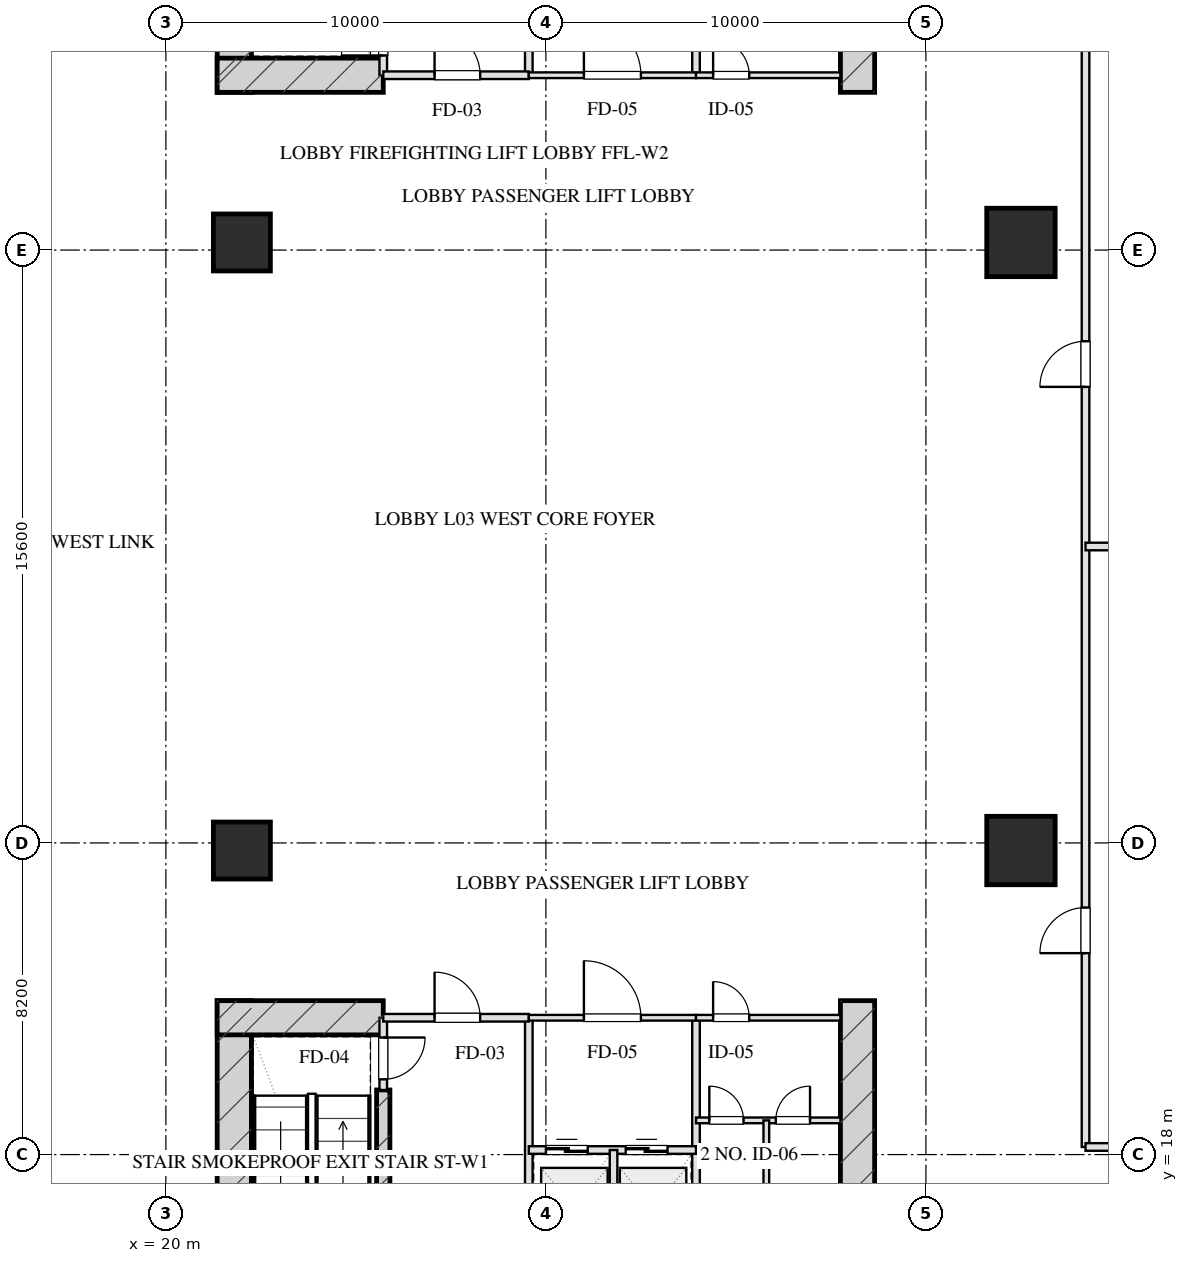
"""IFC4 building model, lengths in metres.
Left out: names, types, materials, properties, quantities, classifications, styles, units other than length and angle.
Written with IfcOpenShell. Run it as: python <this file> out.ifc"""

import sys

from ifc_helpers import new_model, si_unit, direction, frame, frame_2d, origin, origin_2d, place, context, subcontext, project, spatial, rectangle, hollow_rectangle, extrude, element, fill, save


model = new_model("IFC4")
c1 = context("Model", 3, precision=1e-05, world=origin(), true_north=direction((0.0, 1.0)))
c2 = subcontext(c1, "Body", "Model", "MODEL_VIEW")
j1 = project(units=[si_unit("LENGTHUNIT", "METRE"), si_unit("PLANEANGLEUNIT", "RADIAN")], contexts=[c1])
p1 = place(None, origin())
s1 = spatial("IfcSite", under=j1, at=p1, CompositionType="ELEMENT")
p2 = place(p1, origin())
s2 = spatial("IfcBuilding", under=s1, at=p2, CompositionType="ELEMENT")
p3 = place(p2, frame((0.0, 0.0, 16.5)))
s3 = spatial("IfcBuildingStorey", under=s2, at=p3, CompositionType="ELEMENT", Elevation=16.5)
for number, where, z_axis, x_axis in (
    (1, (21.8, 22.05, 0.0), (0.0, 0.0, 1.0), (0.0, -1.0, 0.0)),
    (2, (38.2, 22.05, 0.0), (0.0, 0.0, 1.0), (0.0, -1.0, 0.0)),
):
    element("IfcWall", number, at=place(p3, frame(where, z_axis=z_axis, x_axis=x_axis)), inside=s3, PredefinedType="SHEAR", context=c2, shape_type="SweptSolid", body=[
        extrude(rectangle(XDim=9.78, YDim=0.9, at=frame_2d((4.89, 0.0))), origin(), (0.0, 0.0, 1.0), 5.5),
    ])
p4 = place(p3, frame((25.72, 19.7, 0.0), z_axis=(0.0, 0.0, 1.0), x_axis=(0.0, -1.0, 0.0)))
e3 = element("IfcWall", 3, at=p4, inside=s3, PredefinedType="SHEAR", context=c2, shape_type="SweptSolid", body=[
    extrude(rectangle(XDim=6.98, YDim=0.35, at=frame_2d((3.49, 0.0))), origin(), (0.0, 0.0, 1.0), 5.5),
])
p5 = place(p3, frame((21.35, 21.6, 0.0), z_axis=(0.0, 0.0, 1.0), x_axis=(1.0, 0.0, 0.0)))
e4 = element("IfcWall", 4, at=p5, inside=s3, PredefinedType="SHEAR", context=c2, shape_type="SweptSolid", body=[
    extrude(rectangle(XDim=4.37, YDim=0.9, at=frame_2d((2.185, 0.0))), origin(), (0.0, 0.0, 1.0), 5.5),
])
for number, where, z_axis, x_axis in (
    (5, (21.8, 45.95, 0.0), (0.0, 0.0, 1.0), (0.0, 1.0, 0.0)),
    (6, (38.2, 45.95, 0.0), (0.0, 0.0, 1.0), (0.0, 1.0, 0.0)),
):
    element("IfcWall", number, at=place(p3, frame(where, z_axis=z_axis, x_axis=x_axis)), inside=s3, PredefinedType="SHEAR", context=c2, shape_type="SweptSolid", body=[
        extrude(rectangle(XDim=9.78, YDim=0.9, at=frame_2d((4.89, 0.0))), origin(), (0.0, 0.0, 1.0), 5.5),
    ])
p6 = place(p3, frame((21.35, 46.4, 0.0), z_axis=(0.0, 0.0, 1.0), x_axis=(1.0, 0.0, 0.0)))
e7 = element("IfcWall", 7, at=p6, inside=s3, PredefinedType="SHEAR", context=c2, shape_type="SweptSolid", body=[
    extrude(rectangle(XDim=4.37, YDim=0.9, at=frame_2d((2.185, 0.0))), origin(), (0.0, 0.0, 1.0), 5.5),
])
for number, where, z_axis, x_axis in (
    (8, (22.0, 26.0, 0.0), (0.0, 0.0, 1.0), (1.0, 0.0, 0.0)),
    (9, (22.0, 42.0, 0.0), (0.0, 0.0, 1.0), (1.0, 0.0, 0.0)),
):
    element("IfcColumn", number, at=place(p3, frame(where, z_axis=z_axis, x_axis=x_axis)), inside=s3, PredefinedType="COLUMN", context=c2, shape_type="SweptSolid", body=[
        extrude(rectangle(XDim=1.5, YDim=1.5, at=origin_2d()), origin(), (0.0, 0.0, 1.0), 5.501),
    ])
for number, where, z_axis, x_axis in (
    (10, (42.5, 26.0, 0.0), (0.0, 0.0, 1.0), (1.0, 0.0, 0.0)),
    (11, (42.5, 42.0, 0.0), (0.0, 0.0, 1.0), (1.0, 0.0, 0.0)),
):
    element("IfcColumn", number, at=place(p3, frame(where, z_axis=z_axis, x_axis=x_axis)), inside=s3, PredefinedType="COLUMN", context=c2, shape_type="SweptSolid", body=[
        extrude(hollow_rectangle(XDim=1.8, YDim=1.8, WallThickness=0.06, at=origin_2d()), origin(), (0.0, 0.0, 1.0), 5.501),
    ])
p7 = place(p3, frame((25.72, 21.6, 0.0), z_axis=(0.0, 0.0, 1.0), x_axis=(0.0, -1.0, 0.0)))
e12 = element("IfcWall", 12, at=p7, inside=s3, PredefinedType="PARTITIONING", context=c2, shape_type="SweptSolid", body=[
    extrude(rectangle(XDim=1.9, YDim=0.2, at=frame_2d((0.95, 0.0))), origin(), (0.0, 0.0, 1.0), 5.185),
])
p8 = place(p7, frame((0.52, 0.0, 0.0)))
e13 = element("IfcOpeningElement", 13, at=p8, cuts=e12, PredefinedType="OPENING", context=c2, shape_type="SweptSolid", body=[
    extrude(rectangle(XDim=1.1, YDim=2.05, at=frame_2d((0.55, 1.025))), frame((0.0, 0.11, 0.0), z_axis=(0.0, -1.0, 0.0), x_axis=(1.0, 0.0, 0.0)), (0.0, 0.0, 1.0), 0.22),
])
p9 = place(p3, frame((29.55, 21.6, 0.0), z_axis=(0.0, 0.0, 1.0), x_axis=(0.0, -1.0, 0.0)))
e14 = element("IfcWall", 14, at=p9, inside=s3, PredefinedType="PARTITIONING", context=c2, shape_type="SweptSolid", body=[
    extrude(rectangle(XDim=8.43, YDim=0.2, at=frame_2d((4.215, 0.0))), origin(), (0.0, 0.0, 1.0), 5.185),
])
p10 = place(p3, frame((25.72, 21.6, 0.0), z_axis=(0.0, 0.0, 1.0), x_axis=(1.0, 0.0, 0.0)))
e15 = element("IfcWall", 15, at=p10, inside=s3, PredefinedType="PARTITIONING", context=c2, shape_type="SweptSolid", body=[
    extrude(rectangle(XDim=3.83, YDim=0.2, at=frame_2d((1.915, 0.0))), origin(), (0.0, 0.0, 1.0), 5.185),
])
p11 = place(p10, frame((1.35, 0.0, 0.0)))
e16 = element("IfcOpeningElement", 16, at=p11, cuts=e15, PredefinedType="OPENING", context=c2, shape_type="SweptSolid", body=[
    extrude(rectangle(XDim=1.2, YDim=2.05, at=frame_2d((0.6, 1.025))), frame((0.0, 0.11, 0.0), z_axis=(0.0, -1.0, 0.0), x_axis=(1.0, 0.0, 0.0)), (0.0, 0.0, 1.0), 0.22),
])
p12 = place(p3, frame((33.95, 21.6, 0.0), z_axis=(0.0, 0.0, 1.0), x_axis=(0.0, -1.0, 0.0)))
e17 = element("IfcWall", 17, at=p12, inside=s3, PredefinedType="PARTITIONING", context=c2, shape_type="SweptSolid", body=[
    extrude(rectangle(XDim=8.43, YDim=0.2, at=frame_2d((4.215, 0.0))), origin(), (0.0, 0.0, 1.0), 5.185),
])
p13 = place(p3, frame((29.55, 21.6, 0.0), z_axis=(0.0, 0.0, 1.0), x_axis=(1.0, 0.0, 0.0)))
e18 = element("IfcWall", 18, at=p13, inside=s3, PredefinedType="PARTITIONING", context=c2, shape_type="SweptSolid", body=[
    extrude(rectangle(XDim=4.4, YDim=0.15, at=frame_2d((2.2, 0.0))), origin(), (0.0, 0.0, 1.0), 5.185),
])
p14 = place(p13, frame((1.45, 0.0, 0.0)))
e19 = element("IfcOpeningElement", 19, at=p14, cuts=e18, PredefinedType="OPENING", context=c2, shape_type="SweptSolid", body=[
    extrude(rectangle(XDim=1.5, YDim=2.05, at=frame_2d((0.75, 1.025))), frame((0.0, 0.085, 0.0), z_axis=(0.0, -1.0, 0.0), x_axis=(1.0, 0.0, 0.0)), (0.0, 0.0, 1.0), 0.17),
])
p15 = place(p3, frame((29.55, 18.12, 0.0), z_axis=(0.0, 0.0, 1.0), x_axis=(1.0, 0.0, 0.0)))
e20 = element("IfcWall", 20, at=p15, inside=s3, PredefinedType="PARTITIONING", context=c2, shape_type="SweptSolid", body=[
    extrude(rectangle(XDim=4.4, YDim=0.2, at=frame_2d((2.2, 0.0))), origin(), (0.0, 0.0, 1.0), 5.185),
])
p16 = place(p15, frame((0.45, 0.0, 0.0)))
e21 = element("IfcOpeningElement", 21, at=p16, cuts=e20, PredefinedType="OPENING", context=c2, shape_type="SweptSolid", body=[
    extrude(rectangle(XDim=1.1, YDim=2.05, at=frame_2d((0.55, 1.025))), frame((0.0, 0.11, 0.0), z_axis=(0.0, -1.0, 0.0), x_axis=(1.0, 0.0, 0.0)), (0.0, 0.0, 1.0), 0.22),
])
p17 = place(p15, frame((2.55, 0.0, 0.0)))
e22 = element("IfcOpeningElement", 22, at=p17, cuts=e20, PredefinedType="OPENING", context=c2, shape_type="SweptSolid", body=[
    extrude(rectangle(XDim=1.1, YDim=2.05, at=frame_2d((0.55, 1.025))), frame((0.0, 0.11, 0.0), z_axis=(0.0, -1.0, 0.0), x_axis=(1.0, 0.0, 0.0)), (0.0, 0.0, 1.0), 0.22),
])
p18 = place(p3, frame((31.78, 18.12, 0.0), z_axis=(0.0, 0.0, 1.0), x_axis=(0.0, -1.0, 0.0)))
e23 = element("IfcWall", 23, at=p18, inside=s3, PredefinedType="PARTITIONING", context=c2, shape_type="SweptSolid", body=[
    extrude(rectangle(XDim=4.95, YDim=0.2, at=frame_2d((2.475, 0.0))), origin(), (0.0, 0.0, 1.0), 5.185),
])
p19 = place(p3, frame((33.95, 21.6, 0.0), z_axis=(0.0, 0.0, 1.0), x_axis=(1.0, 0.0, 0.0)))
e24 = element("IfcWall", 24, at=p19, inside=s3, PredefinedType="PARTITIONING", context=c2, shape_type="SweptSolid", body=[
    extrude(rectangle(XDim=3.8, YDim=0.15, at=frame_2d((1.9, 0.0))), origin(), (0.0, 0.0, 1.0), 5.185),
])
p20 = place(p19, frame((0.45, 0.0, 0.0)))
e25 = element("IfcOpeningElement", 25, at=p20, cuts=e24, PredefinedType="OPENING", context=c2, shape_type="SweptSolid", body=[
    extrude(rectangle(XDim=0.95, YDim=2.05, at=frame_2d((0.475, 1.025))), frame((0.0, 0.085, 0.0), z_axis=(0.0, -1.0, 0.0), x_axis=(1.0, 0.0, 0.0)), (0.0, 0.0, 1.0), 0.17),
])
p21 = place(p3, frame((33.95, 18.9, 0.0), z_axis=(0.0, 0.0, 1.0), x_axis=(1.0, 0.0, 0.0)))
e26 = element("IfcWall", 26, at=p21, inside=s3, PredefinedType="PARTITIONING", context=c2, shape_type="SweptSolid", body=[
    extrude(rectangle(XDim=3.8, YDim=0.15, at=frame_2d((1.9, 0.0))), origin(), (0.0, 0.0, 1.0), 5.185),
])
p22 = place(p21, frame((0.35, 0.0, 0.0)))
e27 = element("IfcOpeningElement", 27, at=p22, cuts=e26, PredefinedType="OPENING", context=c2, shape_type="SweptSolid", body=[
    extrude(rectangle(XDim=0.9, YDim=2.05, at=frame_2d((0.45, 1.025))), frame((0.0, 0.085, 0.0), z_axis=(0.0, -1.0, 0.0), x_axis=(1.0, 0.0, 0.0)), (0.0, 0.0, 1.0), 0.17),
])
p23 = place(p21, frame((2.1, 0.0, 0.0)))
e28 = element("IfcOpeningElement", 28, at=p23, cuts=e26, PredefinedType="OPENING", context=c2, shape_type="SweptSolid", body=[
    extrude(rectangle(XDim=0.9, YDim=2.05, at=frame_2d((0.45, 1.025))), frame((0.0, 0.085, 0.0), z_axis=(0.0, -1.0, 0.0), x_axis=(1.0, 0.0, 0.0)), (0.0, 0.0, 1.0), 0.17),
])
p24 = place(p3, frame((35.8, 18.9, 0.0), z_axis=(0.0, 0.0, 1.0), x_axis=(0.0, -1.0, 0.0)))
e29 = element("IfcWall", 29, at=p24, inside=s3, PredefinedType="PARTITIONING", context=c2, shape_type="SweptSolid", body=[
    extrude(rectangle(XDim=5.73, YDim=0.15, at=frame_2d((2.865, 0.0))), origin(), (0.0, 0.0, 1.0), 5.185),
])
p25 = place(p3, frame((25.72, 46.4, 0.0), z_axis=(0.0, 0.0, 1.0), x_axis=(0.0, 1.0, 0.0)))
e30 = element("IfcWall", 30, at=p25, inside=s3, PredefinedType="PARTITIONING", context=c2, shape_type="SweptSolid", body=[
    extrude(rectangle(XDim=1.9, YDim=0.2, at=frame_2d((0.95, 0.0))), origin(), (0.0, 0.0, 1.0), 5.185),
])
p26 = place(p25, frame((0.52, 0.0, 0.0)))
e31 = element("IfcOpeningElement", 31, at=p26, cuts=e30, PredefinedType="OPENING", context=c2, shape_type="SweptSolid", body=[
    extrude(rectangle(XDim=1.1, YDim=2.05, at=frame_2d((0.55, 1.025))), frame((0.0, 0.11, 0.0), z_axis=(0.0, -1.0, 0.0), x_axis=(1.0, 0.0, 0.0)), (0.0, 0.0, 1.0), 0.22),
])
p27 = place(p3, frame((29.55, 46.4, 0.0), z_axis=(0.0, 0.0, 1.0), x_axis=(0.0, 1.0, 0.0)))
e32 = element("IfcWall", 32, at=p27, inside=s3, PredefinedType="PARTITIONING", context=c2, shape_type="SweptSolid", body=[
    extrude(rectangle(XDim=8.43, YDim=0.2, at=frame_2d((4.215, 0.0))), origin(), (0.0, 0.0, 1.0), 5.185),
])
p28 = place(p3, frame((25.72, 46.4, 0.0), z_axis=(0.0, 0.0, 1.0), x_axis=(1.0, 0.0, 0.0)))
e33 = element("IfcWall", 33, at=p28, inside=s3, PredefinedType="PARTITIONING", context=c2, shape_type="SweptSolid", body=[
    extrude(rectangle(XDim=3.83, YDim=0.2, at=frame_2d((1.915, 0.0))), origin(), (0.0, 0.0, 1.0), 5.185),
])
p29 = place(p28, frame((1.35, 0.0, 0.0)))
e34 = element("IfcOpeningElement", 34, at=p29, cuts=e33, PredefinedType="OPENING", context=c2, shape_type="SweptSolid", body=[
    extrude(rectangle(XDim=1.2, YDim=2.05, at=frame_2d((0.6, 1.025))), frame((0.0, 0.11, 0.0), z_axis=(0.0, -1.0, 0.0), x_axis=(1.0, 0.0, 0.0)), (0.0, 0.0, 1.0), 0.22),
])
p30 = place(p3, frame((33.95, 46.4, 0.0), z_axis=(0.0, 0.0, 1.0), x_axis=(0.0, 1.0, 0.0)))
e35 = element("IfcWall", 35, at=p30, inside=s3, PredefinedType="PARTITIONING", context=c2, shape_type="SweptSolid", body=[
    extrude(rectangle(XDim=8.43, YDim=0.2, at=frame_2d((4.215, 0.0))), origin(), (0.0, 0.0, 1.0), 5.185),
])
p31 = place(p3, frame((29.55, 46.4, 0.0), z_axis=(0.0, 0.0, 1.0), x_axis=(1.0, 0.0, 0.0)))
e36 = element("IfcWall", 36, at=p31, inside=s3, PredefinedType="PARTITIONING", context=c2, shape_type="SweptSolid", body=[
    extrude(rectangle(XDim=4.4, YDim=0.15, at=frame_2d((2.2, 0.0))), origin(), (0.0, 0.0, 1.0), 5.185),
])
p32 = place(p31, frame((1.45, 0.0, 0.0)))
e37 = element("IfcOpeningElement", 37, at=p32, cuts=e36, PredefinedType="OPENING", context=c2, shape_type="SweptSolid", body=[
    extrude(rectangle(XDim=1.5, YDim=2.05, at=frame_2d((0.75, 1.025))), frame((0.0, 0.085, 0.0), z_axis=(0.0, -1.0, 0.0), x_axis=(1.0, 0.0, 0.0)), (0.0, 0.0, 1.0), 0.17),
])
p33 = place(p3, frame((33.95, 46.4, 0.0), z_axis=(0.0, 0.0, 1.0), x_axis=(1.0, 0.0, 0.0)))
e38 = element("IfcWall", 38, at=p33, inside=s3, PredefinedType="PARTITIONING", context=c2, shape_type="SweptSolid", body=[
    extrude(rectangle(XDim=3.8, YDim=0.15, at=frame_2d((1.9, 0.0))), origin(), (0.0, 0.0, 1.0), 5.185),
])
p34 = place(p33, frame((0.45, 0.0, 0.0)))
e39 = element("IfcOpeningElement", 39, at=p34, cuts=e38, PredefinedType="OPENING", context=c2, shape_type="SweptSolid", body=[
    extrude(rectangle(XDim=0.95, YDim=2.05, at=frame_2d((0.475, 1.025))), frame((0.0, 0.085, 0.0), z_axis=(0.0, -1.0, 0.0), x_axis=(1.0, 0.0, 0.0)), (0.0, 0.0, 1.0), 0.17),
])
p35 = place(p3, frame((44.2, 18.2, 0.0), z_axis=(0.0, 0.0, 1.0), x_axis=(0.0, 1.0, 0.0)))
e40 = element("IfcWall", 40, at=p35, inside=s3, PredefinedType="PARTITIONING", context=c2, shape_type="SweptSolid", body=[
    extrude(rectangle(XDim=31.6, YDim=0.2, at=frame_2d((15.8, 0.0))), origin(), (0.0, 0.0, 1.0), 5.185),
])
p36 = place(p35, frame((5.1, 0.0, 0.0)))
e41 = element("IfcOpeningElement", 41, at=p36, cuts=e40, PredefinedType="OPENING", context=c2, shape_type="SweptSolid", body=[
    extrude(rectangle(XDim=1.2, YDim=2.05, at=frame_2d((0.6, 1.025))), frame((0.0, 0.11, 0.0), z_axis=(0.0, -1.0, 0.0), x_axis=(1.0, 0.0, 0.0)), (0.0, 0.0, 1.0), 0.22),
])
p37 = place(p35, frame((20.0, 0.0, 0.0)))
e42 = element("IfcOpeningElement", 42, at=p37, cuts=e40, PredefinedType="OPENING", context=c2, shape_type="SweptSolid", body=[
    extrude(rectangle(XDim=1.2, YDim=2.05, at=frame_2d((0.6, 1.025))), frame((0.0, 0.11, 0.0), z_axis=(0.0, -1.0, 0.0), x_axis=(1.0, 0.0, 0.0)), (0.0, 0.0, 1.0), 0.22),
])
p38 = place(p3, frame((44.2, 18.2, 0.0), z_axis=(0.0, 0.0, 1.0), x_axis=(1.0, 0.0, 0.0)))
e43 = element("IfcWall", 43, at=p38, inside=s3, PredefinedType="PARTITIONING", context=c2, shape_type="SweptSolid", body=[
    extrude(rectangle(XDim=30.6, YDim=0.2, at=frame_2d((15.3, 0.0))), origin(), (0.0, 0.0, 1.0), 5.185),
])
p39 = place(p3, frame((44.2, 34.0, 0.0), z_axis=(0.0, 0.0, 1.0), x_axis=(1.0, 0.0, 0.0)))
e44 = element("IfcWall", 44, at=p39, inside=s3, PredefinedType="PARTITIONING", context=c2, shape_type="SweptSolid", body=[
    extrude(rectangle(XDim=30.6, YDim=0.2, at=frame_2d((15.3, 0.0))), origin(), (0.0, 0.0, 1.0), 3.775),
])
p40 = place(p8, origin())
e45 = element("IfcDoor", 45, at=p40, inside=s3, OperationType="SINGLE_SWING_LEFT", PredefinedType="DOOR", context=c2, shape_type="SweptSolid", body=[
    extrude(rectangle(XDim=1.1, YDim=2.05, at=frame_2d((0.55, 1.025))), frame((0.0, 0.025, 0.0), z_axis=(0.0, -1.0, 0.0), x_axis=(1.0, 0.0, 0.0)), (0.0, 0.0, 1.0), 0.05),
])
fill(e13, e45)
p41 = place(p11, origin())
e46 = element("IfcDoor", 46, at=p41, inside=s3, OperationType="SINGLE_SWING_LEFT", PredefinedType="DOOR", context=c2, shape_type="SweptSolid", body=[
    extrude(rectangle(XDim=1.2, YDim=2.05, at=frame_2d((0.6, 1.025))), frame((0.0, 0.025, 0.0), z_axis=(0.0, -1.0, 0.0), x_axis=(1.0, 0.0, 0.0)), (0.0, 0.0, 1.0), 0.05),
])
fill(e16, e46)
p42 = place(p14, origin())
e47 = element("IfcDoor", 47, at=p42, inside=s3, OperationType="SINGLE_SWING_LEFT", PredefinedType="DOOR", context=c2, shape_type="SweptSolid", body=[
    extrude(rectangle(XDim=1.5, YDim=2.05, at=frame_2d((0.75, 1.025))), frame((0.0, 0.025, 0.0), z_axis=(0.0, -1.0, 0.0), x_axis=(1.0, 0.0, 0.0)), (0.0, 0.0, 1.0), 0.05),
])
fill(e19, e47)
p43 = place(p16, origin())
e48 = element("IfcDoor", 48, at=p43, inside=s3, OperationType="DOUBLE_DOOR_SLIDING", PredefinedType="DOOR", context=c2, shape_type="SweptSolid", body=[
    extrude(rectangle(XDim=1.1, YDim=2.05, at=frame_2d((0.55, 1.025))), frame((0.0, 0.025, 0.0), z_axis=(0.0, -1.0, 0.0), x_axis=(1.0, 0.0, 0.0)), (0.0, 0.0, 1.0), 0.05),
])
fill(e21, e48)
p44 = place(p17, origin())
e49 = element("IfcDoor", 49, at=p44, inside=s3, OperationType="DOUBLE_DOOR_SLIDING", PredefinedType="DOOR", context=c2, shape_type="SweptSolid", body=[
    extrude(rectangle(XDim=1.1, YDim=2.05, at=frame_2d((0.55, 1.025))), frame((0.0, 0.025, 0.0), z_axis=(0.0, -1.0, 0.0), x_axis=(1.0, 0.0, 0.0)), (0.0, 0.0, 1.0), 0.05),
])
fill(e22, e49)
p45 = place(p20, origin())
e50 = element("IfcDoor", 50, at=p45, inside=s3, OperationType="SINGLE_SWING_LEFT", PredefinedType="DOOR", context=c2, shape_type="SweptSolid", body=[
    extrude(rectangle(XDim=0.95, YDim=2.05, at=frame_2d((0.475, 1.025))), frame((0.0, 0.025, 0.0), z_axis=(0.0, -1.0, 0.0), x_axis=(1.0, 0.0, 0.0)), (0.0, 0.0, 1.0), 0.05),
])
fill(e25, e50)
p46 = place(p22, origin())
e51 = element("IfcDoor", 51, at=p46, inside=s3, OperationType="SINGLE_SWING_LEFT", PredefinedType="DOOR", context=c2, shape_type="SweptSolid", body=[
    extrude(rectangle(XDim=0.9, YDim=2.05, at=frame_2d((0.45, 1.025))), frame((0.0, 0.025, 0.0), z_axis=(0.0, -1.0, 0.0), x_axis=(1.0, 0.0, 0.0)), (0.0, 0.0, 1.0), 0.05),
])
fill(e27, e51)
p47 = place(p23, origin())
e52 = element("IfcDoor", 52, at=p47, inside=s3, OperationType="SINGLE_SWING_RIGHT", PredefinedType="DOOR", context=c2, shape_type="SweptSolid", body=[
    extrude(rectangle(XDim=0.9, YDim=2.05, at=frame_2d((0.45, 1.025))), frame((0.0, 0.025, 0.0), z_axis=(0.0, -1.0, 0.0), x_axis=(1.0, 0.0, 0.0)), (0.0, 0.0, 1.0), 0.05),
])
fill(e28, e52)
p48 = place(p26, origin())
e53 = element("IfcDoor", 53, at=p48, inside=s3, OperationType="SINGLE_SWING_LEFT", PredefinedType="DOOR", context=c2, shape_type="SweptSolid", body=[
    extrude(rectangle(XDim=1.1, YDim=2.05, at=frame_2d((0.55, 1.025))), frame((0.0, 0.025, 0.0), z_axis=(0.0, -1.0, 0.0), x_axis=(1.0, 0.0, 0.0)), (0.0, 0.0, 1.0), 0.05),
])
fill(e31, e53)
p49 = place(p29, origin())
e54 = element("IfcDoor", 54, at=p49, inside=s3, OperationType="SINGLE_SWING_LEFT", PredefinedType="DOOR", context=c2, shape_type="SweptSolid", body=[
    extrude(rectangle(XDim=1.2, YDim=2.05, at=frame_2d((0.6, 1.025))), frame((0.0, 0.025, 0.0), z_axis=(0.0, -1.0, 0.0), x_axis=(1.0, 0.0, 0.0)), (0.0, 0.0, 1.0), 0.05),
])
fill(e34, e54)
p50 = place(p32, origin())
e55 = element("IfcDoor", 55, at=p50, inside=s3, OperationType="SINGLE_SWING_LEFT", PredefinedType="DOOR", context=c2, shape_type="SweptSolid", body=[
    extrude(rectangle(XDim=1.5, YDim=2.05, at=frame_2d((0.75, 1.025))), frame((0.0, 0.025, 0.0), z_axis=(0.0, -1.0, 0.0), x_axis=(1.0, 0.0, 0.0)), (0.0, 0.0, 1.0), 0.05),
])
fill(e37, e55)
p51 = place(p34, origin())
e56 = element("IfcDoor", 56, at=p51, inside=s3, OperationType="SINGLE_SWING_LEFT", PredefinedType="DOOR", context=c2, shape_type="SweptSolid", body=[
    extrude(rectangle(XDim=0.95, YDim=2.05, at=frame_2d((0.475, 1.025))), frame((0.0, 0.025, 0.0), z_axis=(0.0, -1.0, 0.0), x_axis=(1.0, 0.0, 0.0)), (0.0, 0.0, 1.0), 0.05),
])
fill(e39, e56)
p52 = place(p36, origin())
e57 = element("IfcDoor", 57, at=p52, inside=s3, OperationType="SINGLE_SWING_LEFT", PredefinedType="DOOR", context=c2, shape_type="SweptSolid", body=[
    extrude(rectangle(XDim=1.2, YDim=2.05, at=frame_2d((0.6, 1.025))), frame((0.0, 0.025, 0.0), z_axis=(0.0, -1.0, 0.0), x_axis=(1.0, 0.0, 0.0)), (0.0, 0.0, 1.0), 0.05),
])
fill(e41, e57)
p53 = place(p37, origin())
e58 = element("IfcDoor", 58, at=p53, inside=s3, OperationType="SINGLE_SWING_LEFT", PredefinedType="DOOR", context=c2, shape_type="SweptSolid", body=[
    extrude(rectangle(XDim=1.2, YDim=2.05, at=frame_2d((0.6, 1.025))), frame((0.0, 0.025, 0.0), z_axis=(0.0, -1.0, 0.0), x_axis=(1.0, 0.0, 0.0)), (0.0, 0.0, 1.0), 0.05),
])
fill(e42, e58)
save(model, sys.argv[1])
